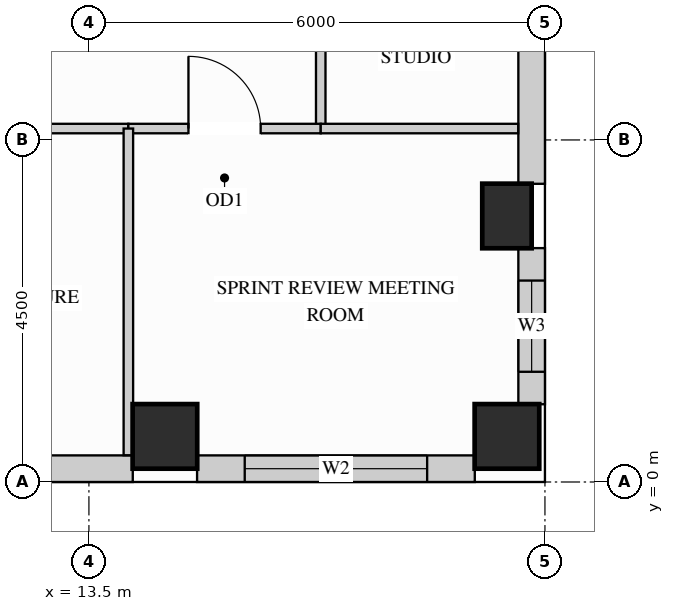
"""IFC4 building model, lengths in metres.
Left out: names, types, materials, properties, quantities, classifications, styles, units other than length and angle.
Written with IfcOpenShell. Run it as: python <this file> out.ifc"""

import sys

from ifc_helpers import new_model, si_unit, direction, frame, frame_2d, origin, origin_2d, place, context, subcontext, project, spatial, rectangle, extrude, source, transform, mapped, element, fill, save


model = new_model("IFC4")
c1 = context("Model", 3, precision=1e-05, world=origin(), true_north=direction((0.0, 1.0)))
c2 = subcontext(c1, "Body", "Model", "MODEL_VIEW")
j1 = project(units=[si_unit("LENGTHUNIT", "METRE"), si_unit("PLANEANGLEUNIT", "RADIAN")], contexts=[c1])
p1 = place(None, origin())
s1 = spatial("IfcSite", under=j1, at=p1, CompositionType="ELEMENT")
p2 = place(p1, origin())
s2 = spatial("IfcBuilding", under=s1, at=p2, CompositionType="ELEMENT")
p3 = place(p2, frame((0.0, 0.0, 234.0)))
s3 = spatial("IfcBuildingStorey", under=s2, at=p3, CompositionType="ELEMENT", Elevation=234.0)
m1 = source(origin(), c2, "Body", "SweptSolid", [
    extrude(rectangle(XDim=0.65, YDim=0.85, at=origin_2d()), origin(), (0.0, 0.0, 1.0), 3.4),
])
p4 = place(p3, frame((19.0, 3.5, 0.0), z_axis=(0.0, 0.0, 1.0), x_axis=(1.0, 0.0, 0.0)))
e1 = element("IfcColumn", 1, at=p4, inside=s3, PredefinedType="COLUMN", context=c2, shape_type="MappedRepresentation", body=[
    mapped(m1, transform((0.0, 0.0, 0.0), x_axis=(1.0, 0.0, 0.0), y_axis=(0.0, 1.0, 0.0), z_axis=(0.0, 0.0, 1.0))),
])
m2 = source(origin(), c2, "Body", "SweptSolid", [
    extrude(rectangle(XDim=0.85, YDim=0.85, at=origin_2d()), origin(), (0.0, 0.0, 1.0), 3.4),
])
for number, where, z_axis, x_axis in (
    (2, (14.5, 0.6, 0.0), (0.0, 0.0, 1.0), (1.0, 0.0, 0.0)),
    (3, (19.0, 0.6, 0.0), (0.0, 0.0, 1.0), (1.0, 0.0, 0.0)),
):
    element("IfcColumn", number, at=place(p3, frame(where, z_axis=z_axis, x_axis=x_axis)), inside=s3, PredefinedType="COLUMN", context=c2, shape_type="MappedRepresentation", body=[
        mapped(m2, transform((0.0, 0.0, 0.0), x_axis=(1.0, 0.0, 0.0), y_axis=(0.0, 1.0, 0.0), z_axis=(0.0, 0.0, 1.0))),
    ])
p5 = place(p3, frame((9.423, 0.175, 0.0), z_axis=(0.0, 0.0, 1.0), x_axis=(1.0, 0.0, 0.0)))
e4 = element("IfcWall", 4, at=p5, inside=s3, PredefinedType="SOLIDWALL", context=c2, shape_type="SweptSolid", body=[
    extrude(rectangle(XDim=4.654, YDim=0.35, at=frame_2d((2.327, 0.0))), origin(), (0.0, 0.0, 1.0), 3.385),
])
p6 = place(p5, frame((1.127, 0.0, 0.78)))
e5 = element("IfcOpeningElement", 5, at=p6, cuts=e4, PredefinedType="OPENING", context=c2, shape_type="SweptSolid", body=[
    extrude(rectangle(XDim=2.4, YDim=2.1, at=frame_2d((1.2, 1.05))), frame((0.0, 0.185, 0.0), z_axis=(0.0, -1.0, 0.0), x_axis=(1.0, 0.0, 0.0)), (0.0, 0.0, 1.0), 0.37),
])
p7 = place(p3, frame((14.923, 0.175, 0.0), z_axis=(0.0, 0.0, 1.0), x_axis=(1.0, 0.0, 0.0)))
e6 = element("IfcWall", 6, at=p7, inside=s3, PredefinedType="SOLIDWALL", context=c2, shape_type="SweptSolid", body=[
    extrude(rectangle(XDim=3.654, YDim=0.35, at=frame_2d((1.827, 0.0))), origin(), (0.0, 0.0, 1.0), 3.385),
])
p8 = place(p7, frame((0.627, 0.0, 0.78)))
e7 = element("IfcOpeningElement", 7, at=p8, cuts=e6, PredefinedType="OPENING", context=c2, shape_type="SweptSolid", body=[
    extrude(rectangle(XDim=2.4, YDim=2.1, at=frame_2d((1.2, 1.05))), frame((0.0, 0.185, 0.0), z_axis=(0.0, -1.0, 0.0), x_axis=(1.0, 0.0, 0.0)), (0.0, 0.0, 1.0), 0.37),
])
p9 = place(p3, frame((19.325, 1.023, 0.0), z_axis=(0.0, 0.0, 1.0), x_axis=(0.0, 1.0, 0.0)))
e8 = element("IfcWall", 8, at=p9, inside=s3, PredefinedType="SOLIDWALL", context=c2, shape_type="SweptSolid", body=[
    extrude(rectangle(XDim=2.054, YDim=0.35, at=frame_2d((1.027, 0.0))), origin(), (0.0, 0.0, 1.0), 2.619),
])
p10 = place(p9, frame((0.427, 0.0, 0.78)))
e9 = element("IfcOpeningElement", 9, at=p10, cuts=e8, PredefinedType="OPENING", context=c2, shape_type="SweptSolid", body=[
    extrude(rectangle(XDim=1.2, YDim=1.659, at=frame_2d((0.6, 0.83))), frame((0.0, 0.185, 0.0), z_axis=(0.0, -1.0, 0.0), x_axis=(1.0, 0.0, 0.0)), (0.0, 0.0, 1.0), 0.37),
])
m3 = source(origin(), c2, "Body", "SweptSolid", [
    extrude(rectangle(XDim=4.154, YDim=0.35, at=frame_2d((2.077, 0.0))), origin(), (0.0, 0.0, 1.0), 2.619),
])
p11 = place(p3, frame((19.325, 3.923, 0.0), z_axis=(0.0, 0.0, 1.0), x_axis=(0.0, 1.0, 0.0)))
e10 = element("IfcWall", 10, at=p11, inside=s3, PredefinedType="SOLIDWALL", context=c2, shape_type="MappedRepresentation", body=[
    mapped(m3, transform((0.0, 0.0, 0.0), x_axis=(1.0, 0.0, 0.0), y_axis=(0.0, 1.0, 0.0), z_axis=(0.0, 0.0, 1.0))),
])
p12 = place(p3, frame((16.55, 4.65, 0.0), z_axis=(0.0, 0.0, 1.0), x_axis=(0.0, 1.0, 0.0)))
e11 = element("IfcWall", 11, at=p12, inside=s3, PredefinedType="PARTITIONING", context=c2, shape_type="SweptSolid", body=[
    extrude(rectangle(XDim=5.95, YDim=0.125, at=frame_2d((2.975, 0.0))), origin(), (0.0, 0.0, 1.0), 3.385),
])
p13 = place(p12, frame((2.5, 0.0, 0.0)))
e12 = element("IfcOpeningElement", 12, at=p13, cuts=e11, PredefinedType="OPENING", context=c2, shape_type="SweptSolid", body=[
    extrude(rectangle(XDim=0.95, YDim=2.15, at=frame_2d((0.475, 1.075))), frame((0.0, 0.073, 0.0), z_axis=(0.0, -1.0, 0.0), x_axis=(1.0, 0.0, 0.0)), (0.0, 0.0, 1.0), 0.145),
])
p14 = place(p3, frame((8.227, 4.65, 0.0), z_axis=(0.0, 0.0, 1.0), x_axis=(1.0, 0.0, 0.0)))
e13 = element("IfcWall", 13, at=p14, inside=s3, PredefinedType="PARTITIONING", context=c2, shape_type="SweptSolid", body=[
    extrude(rectangle(XDim=5.792, YDim=0.125, at=frame_2d((2.896, 0.0))), origin(), (0.0, 0.0, 1.0), 2.848),
])
p15 = place(p14, frame((2.421, 0.0, 0.0)))
e14 = element("IfcOpeningElement", 14, at=p15, cuts=e13, PredefinedType="OPENING", context=c2, shape_type="SweptSolid", body=[
    extrude(rectangle(XDim=0.95, YDim=2.15, at=frame_2d((0.475, 1.075))), frame((0.0, 0.073, 0.0), z_axis=(0.0, -1.0, 0.0), x_axis=(1.0, 0.0, 0.0)), (0.0, 0.0, 1.0), 0.145),
])
p16 = place(p3, frame((14.019, 4.65, 0.0), z_axis=(0.0, 0.0, 1.0), x_axis=(1.0, 0.0, 0.0)))
e15 = element("IfcWall", 15, at=p16, inside=s3, PredefinedType="PARTITIONING", context=c2, shape_type="SweptSolid", body=[
    extrude(rectangle(XDim=2.531, YDim=0.125, at=frame_2d((1.266, 0.0))), origin(), (0.0, 0.0, 1.0), 2.848),
])
p17 = place(p16, frame((0.791, 0.0, 0.0)))
e16 = element("IfcOpeningElement", 16, at=p17, cuts=e15, PredefinedType="OPENING", context=c2, shape_type="SweptSolid", body=[
    extrude(rectangle(XDim=0.95, YDim=2.15, at=frame_2d((0.475, 1.075))), frame((0.0, 0.073, 0.0), z_axis=(0.0, -1.0, 0.0), x_axis=(1.0, 0.0, 0.0)), (0.0, 0.0, 1.0), 0.145),
])
m4 = source(origin(), c2, "Body", "SweptSolid", [
    extrude(rectangle(XDim=2.598, YDim=0.125, at=frame_2d((1.299, 0.0))), origin(), (0.0, 0.0, 1.0), 2.848),
])
p18 = place(p3, frame((16.55, 4.65, 0.0), z_axis=(0.0, 0.0, 1.0), x_axis=(1.0, 0.0, 0.0)))
e17 = element("IfcWall", 17, at=p18, inside=s3, PredefinedType="PARTITIONING", context=c2, shape_type="MappedRepresentation", body=[
    mapped(m4, transform((0.0, 0.0, 0.0), x_axis=(1.0, 0.0, 0.0), y_axis=(0.0, 1.0, 0.0), z_axis=(0.0, 0.0, 1.0))),
])
m5 = source(origin(), c2, "Body", "SweptSolid", [
    extrude(rectangle(XDim=4.298, YDim=0.125, at=frame_2d((2.149, 0.0))), origin(), (0.0, 0.0, 1.0), 3.385),
])
p19 = place(p3, frame((14.019, 0.352, 0.0), z_axis=(0.0, 0.0, 1.0), x_axis=(0.0, 1.0, 0.0)))
e18 = element("IfcWall", 18, at=p19, inside=s3, PredefinedType="PARTITIONING", context=c2, shape_type="MappedRepresentation", body=[
    mapped(m5, transform((0.0, 0.0, 0.0), x_axis=(1.0, 0.0, 0.0), y_axis=(0.0, 1.0, 0.0), z_axis=(0.0, 0.0, 1.0))),
])
m6 = source(origin(), c2, "Body", "SweptSolid", [
    extrude(rectangle(XDim=0.95, YDim=2.15, at=frame_2d((0.475, 1.075))), frame((0.0, 0.025, 0.0), z_axis=(0.0, -1.0, 0.0), x_axis=(1.0, 0.0, 0.0)), (0.0, 0.0, 1.0), 0.05),
])
p20 = place(p17, origin())
e19 = element("IfcDoor", 19, at=p20, inside=s3, OperationType="SINGLE_SWING_LEFT", PredefinedType="DOOR", context=c2, shape_type="MappedRepresentation", body=[
    mapped(m6, transform((0.0, 0.0, 0.0), x_axis=(1.0, 0.0, 0.0), y_axis=(0.0, 1.0, 0.0), z_axis=(0.0, 0.0, 1.0))),
])
fill(e16, e19)
m7 = source(origin(), c2, "Body", "SweptSolid", [
    extrude(rectangle(XDim=2.4, YDim=2.1, at=frame_2d((1.2, 1.05))), frame((0.0, 0.03, 0.0), z_axis=(0.0, -1.0, 0.0), x_axis=(1.0, 0.0, 0.0)), (0.0, 0.0, 1.0), 0.06),
])
p21 = place(p8, origin())
e20 = element("IfcWindow", 20, at=p21, inside=s3, PartitioningType="SINGLE_PANEL", PredefinedType="WINDOW", context=c2, shape_type="MappedRepresentation", body=[
    mapped(m7, transform((0.0, 0.0, 0.0), x_axis=(1.0, 0.0, 0.0), y_axis=(0.0, 1.0, 0.0), z_axis=(0.0, 0.0, 1.0))),
])
fill(e7, e20)
m8 = source(origin(), c2, "Body", "SweptSolid", [
    extrude(rectangle(XDim=1.2, YDim=1.659, at=frame_2d((0.6, 0.83))), frame((0.0, 0.03, 0.0), z_axis=(0.0, -1.0, 0.0), x_axis=(1.0, 0.0, 0.0)), (0.0, 0.0, 1.0), 0.06),
])
p22 = place(p10, origin())
e21 = element("IfcWindow", 21, at=p22, inside=s3, PartitioningType="SINGLE_PANEL", PredefinedType="WINDOW", context=c2, shape_type="MappedRepresentation", body=[
    mapped(m8, transform((0.0, 0.0, 0.0), x_axis=(1.0, 0.0, 0.0), y_axis=(0.0, 1.0, 0.0), z_axis=(0.0, 0.0, 1.0))),
])
fill(e9, e21)
save(model, sys.argv[1])
